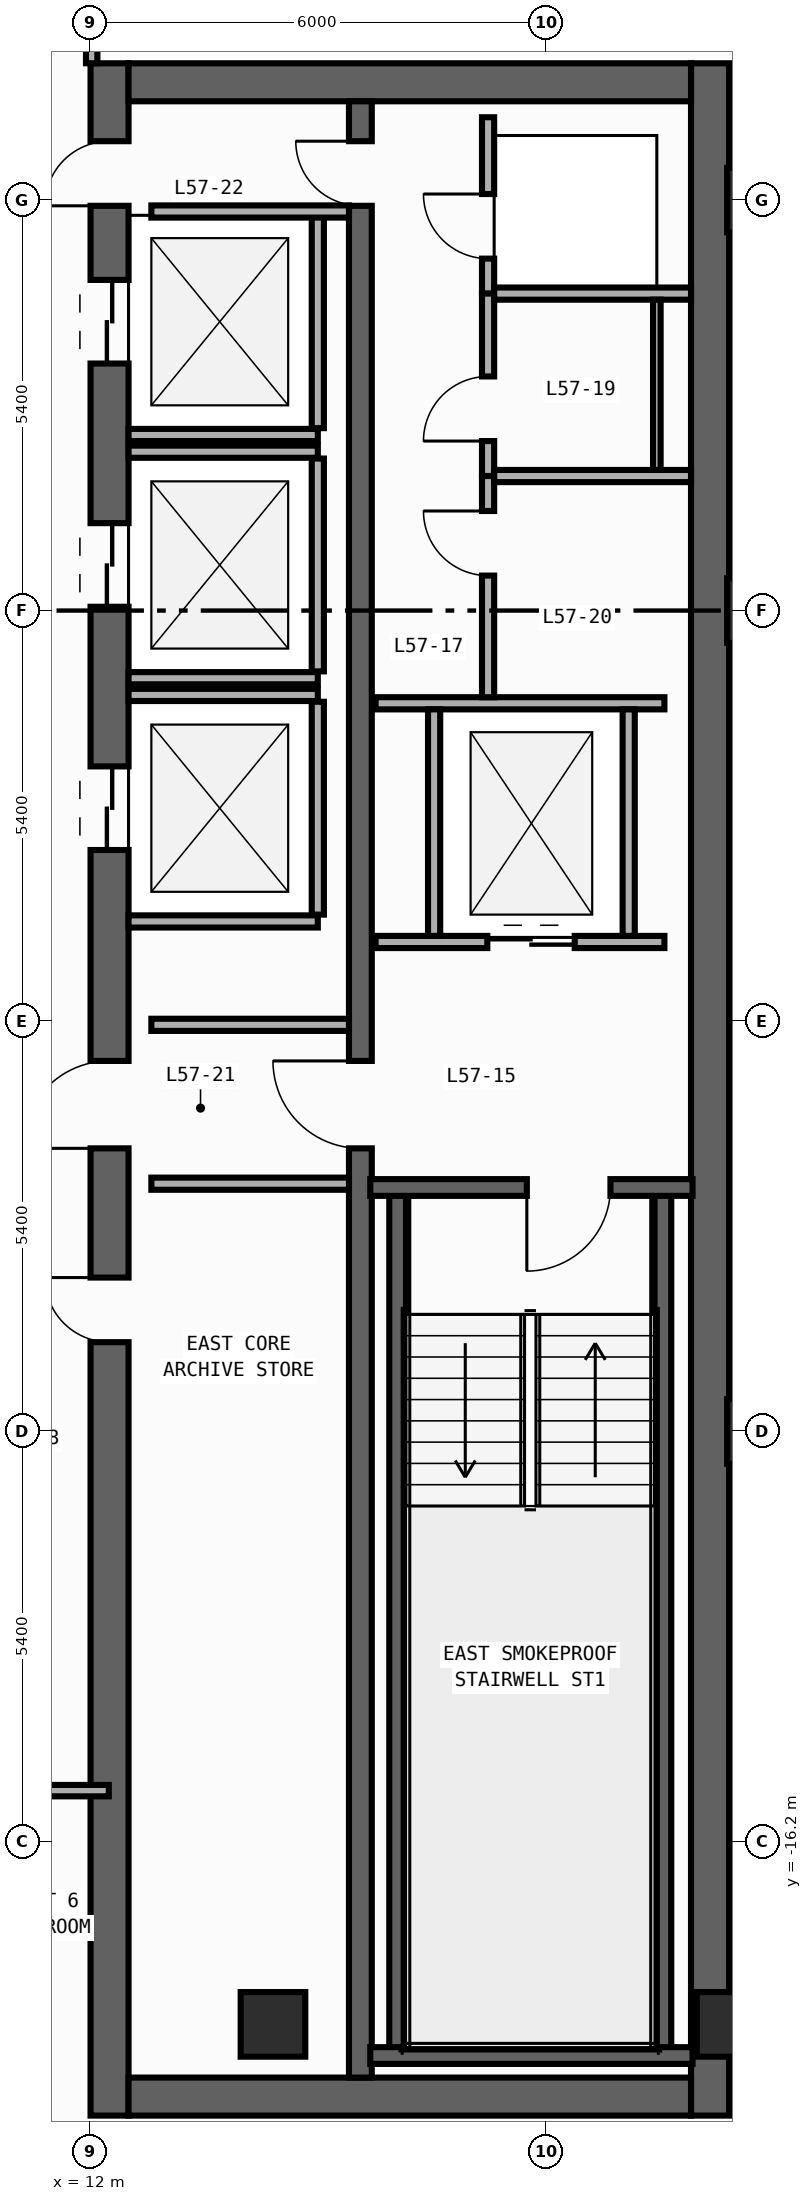
"""IFC4 building model, lengths in metres.
Left out: names, types, materials, properties, quantities, classifications, styles, units other than length and angle.
Written with IfcOpenShell. Run it as: python <this file> out.ifc"""

import sys

from ifc_helpers import new_model, si_unit, direction, frame, frame_2d, origin, origin_2d, place, context, subcontext, project, spatial, rectangle, extrude, element, fill, save


model = new_model("IFC4")
c1 = context("Model", 3, precision=1e-05, world=origin(), true_north=direction((0.0, 1.0)))
c2 = subcontext(c1, "Body", "Model", "MODEL_VIEW")
j1 = project(units=[si_unit("LENGTHUNIT", "METRE"), si_unit("PLANEANGLEUNIT", "RADIAN")], contexts=[c1])
p1 = place(None, origin())
s1 = spatial("IfcSite", under=j1, at=p1, CompositionType="ELEMENT")
p2 = place(p1, origin())
s2 = spatial("IfcBuilding", under=s1, at=p2, CompositionType="ELEMENT")
p3 = place(p2, frame((0.0, 0.0, 244.0)))
s3 = spatial("IfcBuildingStorey", under=s2, at=p3, CompositionType="ELEMENT", Elevation=244.0)
p4 = place(p3, frame((12.25, -19.8, 0.0), z_axis=(0.0, 0.0, 1.0), x_axis=(0.0, 1.0, 0.0)))
e1 = element("IfcWall", 1, at=p4, inside=s3, PredefinedType="SHEAR", context=c2, shape_type="SweptSolid", body=[
    extrude(rectangle(XDim=27.0, YDim=0.5, at=frame_2d((13.5, 0.0))), origin(), (0.0, 0.0, 1.0), 3.34),
])
p5 = place(p4, frame((23.05, 0.0, 0.0)))
e2 = element("IfcOpeningElement", 2, at=p5, cuts=e1, PredefinedType="OPENING", context=c2, shape_type="SweptSolid", body=[
    extrude(rectangle(XDim=1.1, YDim=2.2, at=frame_2d((0.55, 1.1))), frame((0.0, 0.26, 0.0), z_axis=(0.0, -1.0, 0.0), x_axis=(1.0, 0.0, 0.0)), (0.0, 0.0, 1.0), 0.52),
])
p6 = place(p4, frame((19.85, 0.0, 0.0)))
e3 = element("IfcOpeningElement", 3, at=p6, cuts=e1, PredefinedType="OPENING", context=c2, shape_type="SweptSolid", body=[
    extrude(rectangle(XDim=1.1, YDim=2.2, at=frame_2d((0.55, 1.1))), frame((0.0, 0.26, 0.0), z_axis=(0.0, -1.0, 0.0), x_axis=(1.0, 0.0, 0.0)), (0.0, 0.0, 1.0), 0.52),
])
p7 = place(p4, frame((16.65, 0.0, 0.0)))
e4 = element("IfcOpeningElement", 4, at=p7, cuts=e1, PredefinedType="OPENING", context=c2, shape_type="SweptSolid", body=[
    extrude(rectangle(XDim=1.1, YDim=2.2, at=frame_2d((0.55, 1.1))), frame((0.0, 0.26, 0.0), z_axis=(0.0, -1.0, 0.0), x_axis=(1.0, 0.0, 0.0)), (0.0, 0.0, 1.0), 0.52),
])
p8 = place(p4, frame((10.175, 0.0, 0.0)))
e5 = element("IfcOpeningElement", 5, at=p8, cuts=e1, PredefinedType="OPENING", context=c2, shape_type="SweptSolid", body=[
    extrude(rectangle(XDim=0.85, YDim=2.1, at=frame_2d((0.425, 1.05))), frame((0.0, 0.26, 0.0), z_axis=(0.0, -1.0, 0.0), x_axis=(1.0, 0.0, 0.0)), (0.0, 0.0, 1.0), 0.52),
])
p9 = place(p4, frame((12.725, 0.0, 0.0)))
e6 = element("IfcOpeningElement", 6, at=p9, cuts=e1, PredefinedType="OPENING", context=c2, shape_type="SweptSolid", body=[
    extrude(rectangle(XDim=1.15, YDim=2.2, at=frame_2d((0.575, 1.1))), frame((0.0, 0.26, 0.0), z_axis=(0.0, -1.0, 0.0), x_axis=(1.0, 0.0, 0.0)), (0.0, 0.0, 1.0), 0.52),
])
p10 = place(p4, frame((25.125, 0.0, 0.0)))
e7 = element("IfcOpeningElement", 7, at=p10, cuts=e1, PredefinedType="OPENING", context=c2, shape_type="SweptSolid", body=[
    extrude(rectangle(XDim=0.85, YDim=2.1, at=frame_2d((0.425, 1.05))), frame((0.0, 0.26, 0.0), z_axis=(0.0, -1.0, 0.0), x_axis=(1.0, 0.0, 0.0)), (0.0, 0.0, 1.0), 0.52),
])
p11 = place(p3, frame((20.15, -19.8, 0.0), z_axis=(0.0, 0.0, 1.0), x_axis=(0.0, 1.0, 0.0)))
e8 = element("IfcWall", 8, at=p11, inside=s3, PredefinedType="SHEAR", context=c2, shape_type="SweptSolid", body=[
    extrude(rectangle(XDim=27.0, YDim=0.5, at=frame_2d((13.5, 0.0))), origin(), (0.0, 0.0, 1.0), 3.34),
])
for number, where, z_axis, x_axis in (
    (9, (12.5, -19.55, 0.0), (0.0, 0.0, 1.0), (1.0, 0.0, 0.0)),
    (10, (12.5, 6.95, 0.0), (0.0, 0.0, 1.0), (1.0, 0.0, 0.0)),
):
    element("IfcWall", number, at=place(p3, frame(where, z_axis=z_axis, x_axis=x_axis)), inside=s3, PredefinedType="SHEAR", context=c2, shape_type="SweptSolid", body=[
        extrude(rectangle(XDim=7.4, YDim=0.5, at=frame_2d((3.7, 0.0))), origin(), (0.0, 0.0, 1.0), 3.34),
    ])
p12 = place(p3, frame((15.55, -19.3, 0.0), z_axis=(0.0, 0.0, 1.0), x_axis=(0.0, 1.0, 0.0)))
e11 = element("IfcWall", 11, at=p12, inside=s3, PredefinedType="SHEAR", context=c2, shape_type="SweptSolid", body=[
    extrude(rectangle(XDim=26.0, YDim=0.3, at=frame_2d((13.0, 0.0))), origin(), (0.0, 0.0, 1.0), 3.34),
])
p13 = place(p12, frame((12.225, 0.0, 0.0)))
e12 = element("IfcOpeningElement", 12, at=p13, cuts=e11, PredefinedType="OPENING", context=c2, shape_type="SweptSolid", body=[
    extrude(rectangle(XDim=1.15, YDim=2.2, at=frame_2d((0.575, 1.1))), frame((0.0, 0.16, 0.0), z_axis=(0.0, -1.0, 0.0), x_axis=(1.0, 0.0, 0.0)), (0.0, 0.0, 1.0), 0.32),
])
p14 = place(p12, frame((24.625, 0.0, 0.0)))
e13 = element("IfcOpeningElement", 13, at=p14, cuts=e11, PredefinedType="OPENING", context=c2, shape_type="SweptSolid", body=[
    extrude(rectangle(XDim=0.85, YDim=2.1, at=frame_2d((0.425, 1.05))), frame((0.0, 0.16, 0.0), z_axis=(0.0, -1.0, 0.0), x_axis=(1.0, 0.0, 0.0)), (0.0, 0.0, 1.0), 0.32),
])
for number, where, z_axis, x_axis in (
    (14, (16.04, -19.01, 0.0), (0.0, 0.0, 1.0), (0.0, 1.0, 0.0)),
    (15, (19.53, -19.01, 0.0), (0.0, 0.0, 1.0), (0.0, 1.0, 0.0)),
):
    element("IfcWall", number, at=place(p3, frame(where, z_axis=z_axis, x_axis=x_axis)), inside=s3, PredefinedType="SHEAR", context=c2, shape_type="SweptSolid", body=[
        extrude(rectangle(XDim=11.42, YDim=0.22, at=frame_2d((5.71, 0.0))), origin(), (0.0, 0.0, 1.0), 3.34),
    ])
p15 = place(p3, frame((15.68, -19.01, 0.0), z_axis=(0.0, 0.0, 1.0), x_axis=(1.0, 0.0, 0.0)))
e16 = element("IfcWall", 16, at=p15, inside=s3, PredefinedType="SHEAR", context=c2, shape_type="SweptSolid", body=[
    extrude(rectangle(XDim=4.24, YDim=0.22, at=frame_2d((2.12, 0.0))), origin(), (0.0, 0.0, 1.0), 3.34),
])
p16 = place(p3, frame((19.92, -7.59, 0.0), z_axis=(0.0, 0.0, 1.0), x_axis=(-1.0, 0.0, 0.0)))
e17 = element("IfcWall", 17, at=p16, inside=s3, PredefinedType="SHEAR", context=c2, shape_type="SweptSolid", body=[
    extrude(rectangle(XDim=4.24, YDim=0.22, at=frame_2d((2.12, 0.0))), origin(), (0.0, 0.0, 1.0), 3.34),
])
p17 = place(p16, frame((1.08, 0.0, 0.0)))
e18 = element("IfcOpeningElement", 18, at=p17, cuts=e17, PredefinedType="OPENING", context=c2, shape_type="SweptSolid", body=[
    extrude(rectangle(XDim=1.1, YDim=2.2, at=frame_2d((0.55, 1.1))), frame((0.0, 0.12, 0.0), z_axis=(0.0, -1.0, 0.0), x_axis=(1.0, 0.0, 0.0)), (0.0, 0.0, 1.0), 0.24),
])
for number, where, z_axis, x_axis in (
    (19, (20.4, -18.6, 0.0), (0.0, 0.0, 1.0), (1.0, 0.0, 0.0)),
    (20, (14.4, -18.6, 0.0), (0.0, 0.0, 1.0), (1.0, 0.0, 0.0)),
    (21, (20.8, -10.8, 0.0), (0.0, 0.0, 1.0), (1.0, 0.0, 0.0)),
    (22, (20.8, 0.0, 0.0), (0.0, 0.0, 1.0), (1.0, 0.0, 0.0)),
    (23, (20.8, 5.4, 0.0), (0.0, 0.0, 1.0), (1.0, 0.0, 0.0)),
):
    element("IfcColumn", number, at=place(p3, frame(where, z_axis=z_axis, x_axis=x_axis)), inside=s3, PredefinedType="COLUMN", context=c2, shape_type="SweptSolid", body=[
        extrude(rectangle(XDim=0.85, YDim=0.85, at=origin_2d()), origin(), (0.0, 0.0, 1.0), 3.6),
    ])
p18 = place(p3, frame((12.5, 2.31, 0.0), z_axis=(0.0, 0.0, 1.0), x_axis=(1.0, 0.0, 0.0)))
e24 = element("IfcWall", 24, at=p18, inside=s3, PredefinedType="STANDARD", context=c2, shape_type="SweptSolid", body=[
    extrude(rectangle(XDim=2.49, YDim=0.16, at=frame_2d((1.245, 0.0))), origin(), (0.0, 0.0, 1.0), 3.34),
])
p19 = place(p3, frame((14.99, 2.4, 0.0), z_axis=(0.0, 0.0, 1.0), x_axis=(0.0, 1.0, 0.0)))
e25 = element("IfcWall", 25, at=p19, inside=s3, PredefinedType="STANDARD", context=c2, shape_type="SweptSolid", body=[
    extrude(rectangle(XDim=2.8, YDim=0.16, at=frame_2d((1.4, 0.0))), origin(), (0.0, 0.0, 1.0), 3.34),
])
for number, where, z_axis, x_axis in (
    (26, (12.5, -0.89, 0.0), (0.0, 0.0, 1.0), (1.0, 0.0, 0.0)),
    (27, (12.5, 2.09, 0.0), (0.0, 0.0, 1.0), (1.0, 0.0, 0.0)),
):
    element("IfcWall", number, at=place(p3, frame(where, z_axis=z_axis, x_axis=x_axis)), inside=s3, PredefinedType="STANDARD", context=c2, shape_type="SweptSolid", body=[
        extrude(rectangle(XDim=2.49, YDim=0.16, at=frame_2d((1.245, 0.0))), origin(), (0.0, 0.0, 1.0), 3.34),
    ])
p20 = place(p3, frame((14.99, -0.8, 0.0), z_axis=(0.0, 0.0, 1.0), x_axis=(0.0, 1.0, 0.0)))
e28 = element("IfcWall", 28, at=p20, inside=s3, PredefinedType="STANDARD", context=c2, shape_type="SweptSolid", body=[
    extrude(rectangle(XDim=2.8, YDim=0.16, at=frame_2d((1.4, 0.0))), origin(), (0.0, 0.0, 1.0), 3.34),
])
for number, where, z_axis, x_axis in (
    (29, (12.5, -4.09, 0.0), (0.0, 0.0, 1.0), (1.0, 0.0, 0.0)),
    (30, (12.5, -1.11, 0.0), (0.0, 0.0, 1.0), (1.0, 0.0, 0.0)),
):
    element("IfcWall", number, at=place(p3, frame(where, z_axis=z_axis, x_axis=x_axis)), inside=s3, PredefinedType="STANDARD", context=c2, shape_type="SweptSolid", body=[
        extrude(rectangle(XDim=2.49, YDim=0.16, at=frame_2d((1.245, 0.0))), origin(), (0.0, 0.0, 1.0), 3.34),
    ])
p21 = place(p3, frame((14.99, -4.0, 0.0), z_axis=(0.0, 0.0, 1.0), x_axis=(0.0, 1.0, 0.0)))
e31 = element("IfcWall", 31, at=p21, inside=s3, PredefinedType="STANDARD", context=c2, shape_type="SweptSolid", body=[
    extrude(rectangle(XDim=2.8, YDim=0.16, at=frame_2d((1.4, 0.0))), origin(), (0.0, 0.0, 1.0), 3.34),
])
p22 = place(p3, frame((15.75, -4.36, 0.0), z_axis=(0.0, 0.0, 1.0), x_axis=(1.0, 0.0, 0.0)))
e32 = element("IfcWall", 32, at=p22, inside=s3, PredefinedType="STANDARD", context=c2, shape_type="SweptSolid", body=[
    extrude(rectangle(XDim=3.8, YDim=0.16, at=frame_2d((1.9, 0.0))), origin(), (0.0, 0.0, 1.0), 3.34),
])
p23 = place(p22, frame((1.47, 0.0, 0.0)))
e33 = element("IfcOpeningElement", 33, at=p23, cuts=e32, PredefinedType="OPENING", context=c2, shape_type="SweptSolid", body=[
    extrude(rectangle(XDim=1.15, YDim=2.2, at=frame_2d((0.575, 1.1))), frame((0.0, 0.09, 0.0), z_axis=(0.0, -1.0, 0.0), x_axis=(1.0, 0.0, 0.0)), (0.0, 0.0, 1.0), 0.18),
])
p24 = place(p3, frame((15.75, -1.22, 0.0), z_axis=(0.0, 0.0, 1.0), x_axis=(1.0, 0.0, 0.0)))
e34 = element("IfcWall", 34, at=p24, inside=s3, PredefinedType="STANDARD", context=c2, shape_type="SweptSolid", body=[
    extrude(rectangle(XDim=3.8, YDim=0.16, at=frame_2d((1.9, 0.0))), origin(), (0.0, 0.0, 1.0), 3.34),
])
for number, where, z_axis, x_axis in (
    (35, (16.52, -4.28, 0.0), (0.0, 0.0, 1.0), (0.0, 1.0, 0.0)),
    (36, (19.08, -4.28, 0.0), (0.0, 0.0, 1.0), (0.0, 1.0, 0.0)),
):
    element("IfcWall", number, at=place(p3, frame(where, z_axis=z_axis, x_axis=x_axis)), inside=s3, PredefinedType="STANDARD", context=c2, shape_type="SweptSolid", body=[
        extrude(rectangle(XDim=2.98, YDim=0.16, at=frame_2d((1.49, 0.0))), origin(), (0.0, 0.0, 1.0), 3.34),
    ])
for number, where, z_axis, x_axis in (
    (37, (12.8, -5.45, 0.0), (0.0, 0.0, 1.0), (1.0, 0.0, 0.0)),
    (38, (12.8, -7.54, 0.0), (0.0, 0.0, 1.0), (1.0, 0.0, 0.0)),
    (39, (12.8, 5.25, 0.0), (0.0, 0.0, 1.0), (1.0, 0.0, 0.0)),
):
    element("IfcWall", number, at=place(p3, frame(where, z_axis=z_axis, x_axis=x_axis)), inside=s3, PredefinedType="STANDARD", context=c2, shape_type="SweptSolid", body=[
        extrude(rectangle(XDim=2.6, YDim=0.16, at=frame_2d((1.3, 0.0))), origin(), (0.0, 0.0, 1.0), 3.34),
    ])
p25 = place(p3, frame((17.23, 4.17, 0.0), z_axis=(0.0, 0.0, 1.0), x_axis=(0.0, 1.0, 0.0)))
e40 = element("IfcWall", 40, at=p25, inside=s3, PredefinedType="PARTITIONING", context=c2, shape_type="SweptSolid", body=[
    extrude(rectangle(XDim=2.32, YDim=0.16, at=frame_2d((1.16, 0.0))), origin(), (0.0, 0.0, 1.0), 3.34),
])
p26 = place(p25, frame((0.46, 0.0, 0.0)))
e41 = element("IfcOpeningElement", 41, at=p26, cuts=e40, PredefinedType="OPENING", context=c2, shape_type="SweptSolid", body=[
    extrude(rectangle(XDim=0.85, YDim=2.1, at=frame_2d((0.425, 1.05))), frame((0.0, 0.09, 0.0), z_axis=(0.0, -1.0, 0.0), x_axis=(1.0, 0.0, 0.0)), (0.0, 0.0, 1.0), 0.18),
])
p27 = place(p3, frame((17.23, 1.77, 0.0), z_axis=(0.0, 0.0, 1.0), x_axis=(0.0, 1.0, 0.0)))
e42 = element("IfcWall", 42, at=p27, inside=s3, PredefinedType="PARTITIONING", context=c2, shape_type="SweptSolid", body=[
    extrude(rectangle(XDim=2.4, YDim=0.16, at=frame_2d((1.2, 0.0))), origin(), (0.0, 0.0, 1.0), 3.34),
])
p28 = place(p27, frame((0.46, 0.0, 0.0)))
e43 = element("IfcOpeningElement", 43, at=p28, cuts=e42, PredefinedType="OPENING", context=c2, shape_type="SweptSolid", body=[
    extrude(rectangle(XDim=0.85, YDim=2.1, at=frame_2d((0.425, 1.05))), frame((0.0, 0.09, 0.0), z_axis=(0.0, -1.0, 0.0), x_axis=(1.0, 0.0, 0.0)), (0.0, 0.0, 1.0), 0.18),
])
p29 = place(p3, frame((17.23, -1.14, 0.0), z_axis=(0.0, 0.0, 1.0), x_axis=(0.0, 1.0, 0.0)))
e44 = element("IfcWall", 44, at=p29, inside=s3, PredefinedType="PARTITIONING", context=c2, shape_type="SweptSolid", body=[
    extrude(rectangle(XDim=2.91, YDim=0.16, at=frame_2d((1.455, 0.0))), origin(), (0.0, 0.0, 1.0), 3.34),
])
p30 = place(p29, frame((1.6, 0.0, 0.0)))
e45 = element("IfcOpeningElement", 45, at=p30, cuts=e44, PredefinedType="OPENING", context=c2, shape_type="SweptSolid", body=[
    extrude(rectangle(XDim=0.85, YDim=2.1, at=frame_2d((0.425, 1.05))), frame((0.0, 0.09, 0.0), z_axis=(0.0, -1.0, 0.0), x_axis=(1.0, 0.0, 0.0)), (0.0, 0.0, 1.0), 0.18),
])
for number, where, z_axis, x_axis in (
    (46, (17.31, 4.17, 0.0), (0.0, 0.0, 1.0), (1.0, 0.0, 0.0)),
    (47, (17.31, 1.77, 0.0), (0.0, 0.0, 1.0), (1.0, 0.0, 0.0)),
):
    element("IfcWall", number, at=place(p3, frame(where, z_axis=z_axis, x_axis=x_axis)), inside=s3, PredefinedType="PARTITIONING", context=c2, shape_type="SweptSolid", body=[
        extrude(rectangle(XDim=2.59, YDim=0.16, at=frame_2d((1.295, 0.0))), origin(), (0.0, 0.0, 1.0), 3.34),
    ])
p31 = place(p3, frame((12.015, 7.2, 0.0), z_axis=(0.0, 0.0, 1.0), x_axis=(0.0, 1.0, 0.0)))
e48 = element("IfcWall", 48, at=p31, inside=s3, PredefinedType="PARTITIONING", context=c2, shape_type="SweptSolid", body=[
    extrude(rectangle(XDim=6.52, YDim=0.15, at=frame_2d((3.26, 0.0))), origin(), (0.0, 0.0, 1.0), 3.34),
])
p32 = place(p31, frame((0.67, 0.0, 0.0)))
e49 = element("IfcOpeningElement", 49, at=p32, cuts=e48, PredefinedType="OPENING", context=c2, shape_type="SweptSolid", body=[
    extrude(rectangle(XDim=0.9, YDim=2.15, at=frame_2d((0.45, 1.075))), frame((0.0, 0.085, 0.0), z_axis=(0.0, -1.0, 0.0), x_axis=(1.0, 0.0, 0.0)), (0.0, 0.0, 1.0), 0.17),
])
p33 = place(p3, frame((6.19, -15.525, 0.0), z_axis=(0.0, 0.0, 1.0), x_axis=(1.0, 0.0, 0.0)))
e50 = element("IfcWall", 50, at=p33, inside=s3, PredefinedType="PARTITIONING", context=c2, shape_type="SweptSolid", body=[
    extrude(rectangle(XDim=6.05, YDim=0.15, at=frame_2d((3.025, 0.0))), origin(), (0.0, 0.0, 1.0), 3.34),
])
p34 = place(p33, frame((0.46, 0.0, 0.0)))
e51 = element("IfcOpeningElement", 51, at=p34, cuts=e50, PredefinedType="OPENING", context=c2, shape_type="SweptSolid", body=[
    extrude(rectangle(XDim=0.9, YDim=2.15, at=frame_2d((0.45, 1.075))), frame((0.0, 0.085, 0.0), z_axis=(0.0, -1.0, 0.0), x_axis=(1.0, 0.0, 0.0)), (0.0, 0.0, 1.0), 0.17),
])
p35 = place(p3, frame((19.45, 4.09, 0.0), z_axis=(0.0, 0.0, 1.0), x_axis=(0.0, -1.0, 0.0)))
e52 = element("IfcWall", 52, at=p35, inside=s3, PredefinedType="PARTITIONING", context=c2, shape_type="SweptSolid", body=[
    extrude(rectangle(XDim=2.24, YDim=0.1, at=frame_2d((1.12, 0.0))), origin(), (0.0, 0.0, 1.0), 3.34),
])
p36 = place(p17, origin())
e53 = element("IfcDoor", 53, at=p36, inside=s3, OperationType="SINGLE_SWING_RIGHT", PredefinedType="DOOR", context=c2, shape_type="SweptSolid", body=[
    extrude(rectangle(XDim=1.1, YDim=2.2, at=frame_2d((0.55, 1.1))), frame((0.0, 0.025, 0.0), z_axis=(0.0, -1.0, 0.0), x_axis=(1.0, 0.0, 0.0)), (0.0, 0.0, 1.0), 0.05),
])
fill(e18, e53)
p37 = place(p5, origin())
e54 = element("IfcDoor", 54, at=p37, inside=s3, OperationType="DOUBLE_DOOR_SLIDING", PredefinedType="DOOR", context=c2, shape_type="SweptSolid", body=[
    extrude(rectangle(XDim=1.1, YDim=2.2, at=frame_2d((0.55, 1.1))), frame((0.0, 0.025, 0.0), z_axis=(0.0, -1.0, 0.0), x_axis=(1.0, 0.0, 0.0)), (0.0, 0.0, 1.0), 0.05),
])
fill(e2, e54)
p38 = place(p6, origin())
e55 = element("IfcDoor", 55, at=p38, inside=s3, OperationType="DOUBLE_DOOR_SLIDING", PredefinedType="DOOR", context=c2, shape_type="SweptSolid", body=[
    extrude(rectangle(XDim=1.1, YDim=2.2, at=frame_2d((0.55, 1.1))), frame((0.0, 0.025, 0.0), z_axis=(0.0, -1.0, 0.0), x_axis=(1.0, 0.0, 0.0)), (0.0, 0.0, 1.0), 0.05),
])
fill(e3, e55)
p39 = place(p7, origin())
e56 = element("IfcDoor", 56, at=p39, inside=s3, OperationType="DOUBLE_DOOR_SLIDING", PredefinedType="DOOR", context=c2, shape_type="SweptSolid", body=[
    extrude(rectangle(XDim=1.1, YDim=2.2, at=frame_2d((0.55, 1.1))), frame((0.0, 0.025, 0.0), z_axis=(0.0, -1.0, 0.0), x_axis=(1.0, 0.0, 0.0)), (0.0, 0.0, 1.0), 0.05),
])
fill(e4, e56)
p40 = place(p8, origin())
e57 = element("IfcDoor", 57, at=p40, inside=s3, OperationType="SINGLE_SWING_RIGHT", PredefinedType="DOOR", context=c2, shape_type="SweptSolid", body=[
    extrude(rectangle(XDim=0.85, YDim=2.1, at=frame_2d((0.425, 1.05))), frame((0.0, 0.025, 0.0), z_axis=(0.0, -1.0, 0.0), x_axis=(1.0, 0.0, 0.0)), (0.0, 0.0, 1.0), 0.05),
])
fill(e5, e57)
p41 = place(p9, origin())
e58 = element("IfcDoor", 58, at=p41, inside=s3, OperationType="SINGLE_SWING_LEFT", PredefinedType="DOOR", context=c2, shape_type="SweptSolid", body=[
    extrude(rectangle(XDim=1.15, YDim=2.2, at=frame_2d((0.575, 1.1))), frame((0.0, 0.025, 0.0), z_axis=(0.0, -1.0, 0.0), x_axis=(1.0, 0.0, 0.0)), (0.0, 0.0, 1.0), 0.05),
])
fill(e6, e58)
p42 = place(p13, origin())
e59 = element("IfcDoor", 59, at=p42, inside=s3, OperationType="SINGLE_SWING_RIGHT", PredefinedType="DOOR", context=c2, shape_type="SweptSolid", body=[
    extrude(rectangle(XDim=1.15, YDim=2.2, at=frame_2d((0.575, 1.1))), frame((0.0, 0.025, 0.0), z_axis=(0.0, -1.0, 0.0), x_axis=(1.0, 0.0, 0.0)), (0.0, 0.0, 1.0), 0.05),
])
fill(e12, e59)
p43 = place(p10, origin())
e60 = element("IfcDoor", 60, at=p43, inside=s3, OperationType="SINGLE_SWING_LEFT", PredefinedType="DOOR", context=c2, shape_type="SweptSolid", body=[
    extrude(rectangle(XDim=0.85, YDim=2.1, at=frame_2d((0.425, 1.05))), frame((0.0, 0.025, 0.0), z_axis=(0.0, -1.0, 0.0), x_axis=(1.0, 0.0, 0.0)), (0.0, 0.0, 1.0), 0.05),
])
fill(e7, e60)
p44 = place(p14, origin())
e61 = element("IfcDoor", 61, at=p44, inside=s3, OperationType="SINGLE_SWING_RIGHT", PredefinedType="DOOR", context=c2, shape_type="SweptSolid", body=[
    extrude(rectangle(XDim=0.85, YDim=2.1, at=frame_2d((0.425, 1.05))), frame((0.0, 0.025, 0.0), z_axis=(0.0, -1.0, 0.0), x_axis=(1.0, 0.0, 0.0)), (0.0, 0.0, 1.0), 0.05),
])
fill(e13, e61)
p45 = place(p23, origin())
e62 = element("IfcDoor", 62, at=p45, inside=s3, OperationType="DOUBLE_DOOR_SLIDING", PredefinedType="DOOR", context=c2, shape_type="SweptSolid", body=[
    extrude(rectangle(XDim=1.15, YDim=2.2, at=frame_2d((0.575, 1.1))), frame((0.0, 0.025, 0.0), z_axis=(0.0, -1.0, 0.0), x_axis=(1.0, 0.0, 0.0)), (0.0, 0.0, 1.0), 0.05),
])
fill(e33, e62)
p46 = place(p26, origin())
e63 = element("IfcDoor", 63, at=p46, inside=s3, OperationType="SINGLE_SWING_RIGHT", PredefinedType="DOOR", context=c2, shape_type="SweptSolid", body=[
    extrude(rectangle(XDim=0.85, YDim=2.1, at=frame_2d((0.425, 1.05))), frame((0.0, 0.025, 0.0), z_axis=(0.0, -1.0, 0.0), x_axis=(1.0, 0.0, 0.0)), (0.0, 0.0, 1.0), 0.05),
])
fill(e41, e63)
p47 = place(p28, origin())
e64 = element("IfcDoor", 64, at=p47, inside=s3, OperationType="SINGLE_SWING_LEFT", PredefinedType="DOOR", context=c2, shape_type="SweptSolid", body=[
    extrude(rectangle(XDim=0.85, YDim=2.1, at=frame_2d((0.425, 1.05))), frame((0.0, 0.025, 0.0), z_axis=(0.0, -1.0, 0.0), x_axis=(1.0, 0.0, 0.0)), (0.0, 0.0, 1.0), 0.05),
])
fill(e43, e64)
p48 = place(p30, origin())
e65 = element("IfcDoor", 65, at=p48, inside=s3, OperationType="SINGLE_SWING_RIGHT", PredefinedType="DOOR", context=c2, shape_type="SweptSolid", body=[
    extrude(rectangle(XDim=0.85, YDim=2.1, at=frame_2d((0.425, 1.05))), frame((0.0, 0.025, 0.0), z_axis=(0.0, -1.0, 0.0), x_axis=(1.0, 0.0, 0.0)), (0.0, 0.0, 1.0), 0.05),
])
fill(e45, e65)
save(model, sys.argv[1])
